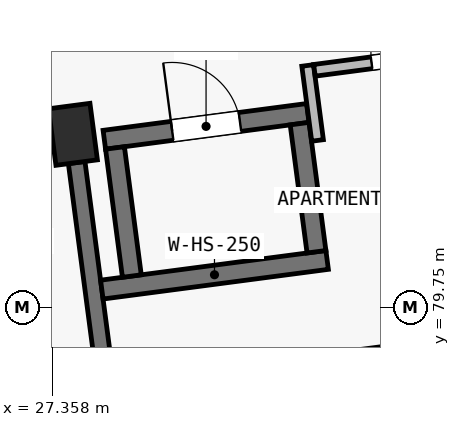
"""IFC4 building model, lengths in metres.
Left out: names, types, materials, properties, quantities, classifications, styles, units other than length and angle.
Written with IfcOpenShell. Run it as: python <this file> out.ifc"""

import sys

from ifc_helpers import new_model, si_unit, direction, frame, frame_2d, origin, origin_2d, place, context, subcontext, project, spatial, rectangle, extrude, element, fill, save


model = new_model("IFC4")
c1 = context("Model", 3, precision=1e-05, world=origin(), true_north=direction((0.0, 1.0)))
c2 = subcontext(c1, "Body", "Model", "MODEL_VIEW")
j1 = project(units=[si_unit("LENGTHUNIT", "METRE"), si_unit("PLANEANGLEUNIT", "RADIAN")], contexts=[c1])
p1 = place(None, origin())
s1 = spatial("IfcSite", under=j1, at=p1, CompositionType="ELEMENT")
p2 = place(p1, origin())
s2 = spatial("IfcBuilding", under=s1, at=p2, CompositionType="ELEMENT")
p3 = place(p2, frame((0.0, 0.0, 18.15)))
s3 = spatial("IfcBuildingStorey", under=s2, at=p3, CompositionType="ELEMENT", Elevation=18.15)
p4 = place(p3, frame((27.631, 82.031, 0.0), z_axis=(0.0, 0.0, 1.0), x_axis=(0.991444861374, 0.13052619222, 0.0)))
e1 = element("IfcColumn", 1, at=p4, inside=s3, PredefinedType="COLUMN", context=c2, shape_type="SweptSolid", body=[
    extrude(rectangle(XDim=0.55, YDim=0.75, at=origin_2d()), origin(), (0.0, 0.0, 1.0), 3.25),
])
p5 = place(p3, frame((28.601, 74.669, 0.0), z_axis=(0.0, 0.0, 1.0), x_axis=(-0.130553049113, 0.991441325227, 0.0)))
e2 = element("IfcWall", 2, at=p5, inside=s3, PredefinedType="SHEAR", context=c2, shape_type="SweptSolid", body=[
    extrude(rectangle(XDim=7.05, YDim=0.22, at=frame_2d((3.525, 0.0))), origin(), (0.0, 0.0, 1.0), 2.5),
])
p6 = place(p3, frame((28.011, 79.988, 0.0), z_axis=(0.0, 0.0, 1.0), x_axis=(0.991439837467, 0.130564346904, 0.0)))
e3 = element("IfcWall", 3, at=p6, inside=s3, PredefinedType="SHEAR", context=c2, shape_type="SweptSolid", body=[
    extrude(rectangle(XDim=2.99, YDim=0.25, at=frame_2d((1.495, 0.0))), origin(), (0.0, 0.0, 1.0), 3.25),
])
p7 = place(p3, frame((28.044, 81.959, 0.0), z_axis=(0.0, 0.0, 1.0), x_axis=(0.991439824936, 0.130564442062, 0.0)))
e4 = element("IfcWall", 4, at=p7, inside=s3, PredefinedType="SHEAR", context=c2, shape_type="SweptSolid", body=[
    extrude(rectangle(XDim=2.7, YDim=0.25, at=frame_2d((1.35, 0.0))), origin(), (0.0, 0.0, 1.0), 3.25),
])
p8 = place(p7, frame((0.9, 0.0, 0.0)))
e5 = element("IfcOpeningElement", 5, at=p8, cuts=e4, PredefinedType="OPENING", context=c2, shape_type="SweptSolid", body=[
    extrude(rectangle(XDim=0.9, YDim=2.05, at=frame_2d((0.45, 1.025))), frame((0.0, 0.14, 0.0), z_axis=(0.0, -1.0, 0.0), x_axis=(1.0, 0.0, 0.0)), (0.0, 0.0, 1.0), 0.28),
])
p9 = place(p3, frame((28.406, 80.166, 0.0), z_axis=(0.0, 0.0, 1.0), x_axis=(-0.130413643681, 0.991459672171, 0.0)))
e6 = element("IfcWall", 6, at=p9, inside=s3, PredefinedType="SHEAR", context=c2, shape_type="SweptSolid", body=[
    extrude(rectangle(XDim=1.7, YDim=0.25, at=frame_2d((0.85, 0.0))), origin(), (0.0, 0.0, 1.0), 3.25),
])
p10 = place(p3, frame((30.835, 80.486, 0.0), z_axis=(0.0, 0.0, 1.0), x_axis=(-0.1305548243, 0.991441091468, 0.0)))
e7 = element("IfcWall", 7, at=p10, inside=s3, PredefinedType="SHEAR", context=c2, shape_type="SweptSolid", body=[
    extrude(rectangle(XDim=1.7, YDim=0.25, at=frame_2d((0.85, 0.0))), origin(), (0.0, 0.0, 1.0), 3.25),
])
p11 = place(p3, frame((30.849, 81.95, 0.0), z_axis=(0.0, 0.0, 1.0), x_axis=(-0.13055608231, 0.99144092581, 0.0)))
e8 = element("IfcWall", 8, at=p11, inside=s3, PredefinedType="PARTITIONING", context=c2, shape_type="SweptSolid", body=[
    extrude(rectangle(XDim=0.995, YDim=0.155, at=frame_2d((0.498, 0.0))), origin(), (0.0, 0.0, 1.0), 2.97),
])
p12 = place(p3, frame((30.809, 82.873, 0.0), z_axis=(0.0, 0.0, 1.0), x_axis=(0.991447652655, 0.130504988581, 0.0)))
e9 = element("IfcWall", 9, at=p12, inside=s3, PredefinedType="PARTITIONING", context=c2, shape_type="SweptSolid", body=[
    extrude(rectangle(XDim=5.255, YDim=0.155, at=frame_2d((2.627, 0.0))), origin(), (0.0, 0.0, 1.0), 2.97),
])
p13 = place(p12, frame((0.758, 0.0, 0.0)))
e10 = element("IfcOpeningElement", 10, at=p13, cuts=e9, PredefinedType="OPENING", context=c2, shape_type="SweptSolid", body=[
    extrude(rectangle(XDim=0.98, YDim=2.15, at=frame_2d((0.49, 1.075))), frame((0.0, 0.093, 0.0), z_axis=(0.0, -1.0, 0.0), x_axis=(1.0, 0.0, 0.0)), (0.0, 0.0, 1.0), 0.185),
])
p14 = place(p3, frame((28.183, 78.724, 0.0), z_axis=(0.0, 0.0, 1.0), x_axis=(0.991443173156, 0.130539014865, 0.0)))
e11 = element("IfcWall", 11, at=p14, inside=s3, PredefinedType="PARTITIONING", context=c2, shape_type="SweptSolid", body=[
    extrude(rectangle(XDim=5.68, YDim=0.1, at=frame_2d((2.84, 0.0))), origin(), (0.0, 0.0, 1.0), 2.97),
])
p15 = place(p14, frame((3.595, 0.0, 0.0)))
e12 = element("IfcOpeningElement", 12, at=p15, cuts=e11, PredefinedType="OPENING", context=c2, shape_type="SweptSolid", body=[
    extrude(rectangle(XDim=0.88, YDim=2.1, at=frame_2d((0.44, 1.05))), frame((0.0, 0.065, 0.0), z_axis=(0.0, -1.0, 0.0), x_axis=(1.0, 0.0, 0.0)), (0.0, 0.0, 1.0), 0.13),
])
p16 = place(p13, origin())
e13 = element("IfcDoor", 13, at=p16, inside=s3, OperationType="SINGLE_SWING_RIGHT", PredefinedType="DOOR", context=c2, shape_type="SweptSolid", body=[
    extrude(rectangle(XDim=0.98, YDim=2.15, at=frame_2d((0.49, 1.075))), frame((0.0, 0.025, 0.0), z_axis=(0.0, -1.0, 0.0), x_axis=(1.0, 0.0, 0.0)), (0.0, 0.0, 1.0), 0.05),
])
fill(e10, e13)
p17 = place(p8, origin())
e14 = element("IfcDoor", 14, at=p17, inside=s3, OperationType="SINGLE_SWING_LEFT", PredefinedType="DOOR", context=c2, shape_type="SweptSolid", body=[
    extrude(rectangle(XDim=0.9, YDim=2.05, at=frame_2d((0.45, 1.025))), frame((0.0, 0.025, 0.0), z_axis=(0.0, -1.0, 0.0), x_axis=(1.0, 0.0, 0.0)), (0.0, 0.0, 1.0), 0.05),
])
fill(e5, e14)
save(model, sys.argv[1])
